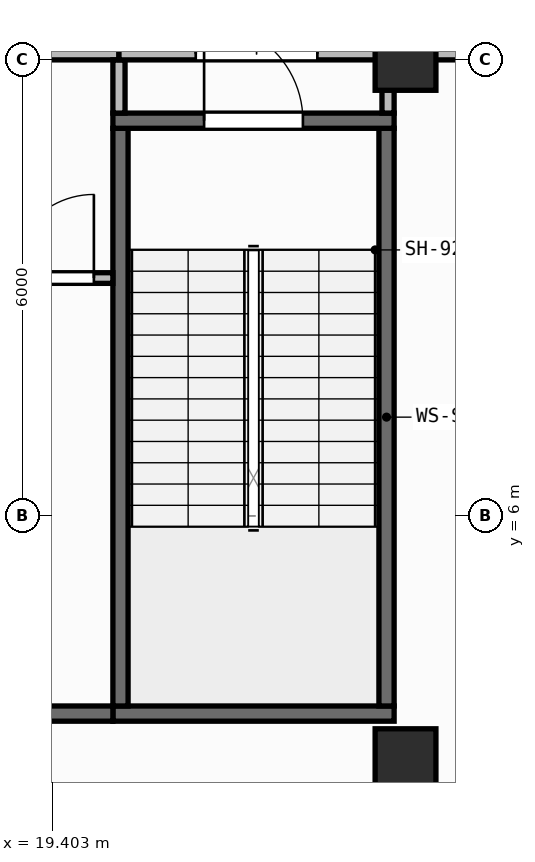
"""IFC4 building model, lengths in metres.
Left out: names, types, materials, properties, quantities, classifications, styles, units other than length and angle.
Written with IfcOpenShell. Run it as: python <this file> out.ifc"""

import sys

from ifc_helpers import new_model, si_unit, direction, frame, frame_2d, origin, origin_2d, place, context, subcontext, project, spatial, rectangle, extrude, element, fill, save


model = new_model("IFC4")
c1 = context("Model", 3, precision=1e-05, world=origin(), true_north=direction((0.0, 1.0)))
c2 = subcontext(c1, "Body", "Model", "MODEL_VIEW")
j1 = project(units=[si_unit("LENGTHUNIT", "METRE"), si_unit("PLANEANGLEUNIT", "RADIAN")], contexts=[c1])
p1 = place(None, origin())
s1 = spatial("IfcSite", under=j1, at=p1, CompositionType="ELEMENT")
p2 = place(p1, origin())
s2 = spatial("IfcBuilding", under=s1, at=p2, CompositionType="ELEMENT")
p3 = place(p2, frame((0.0, 0.0, 303.95)))
s3 = spatial("IfcBuildingStorey", under=s2, at=p3, CompositionType="ELEMENT", Elevation=303.95)
for number, where, z_axis, x_axis in (
    (1, (24.05, 2.8, 0.0), (0.0, 0.0, 1.0), (1.0, 0.0, 0.0)),
    (2, (24.05, 12.0, 0.0), (0.0, 0.0, 1.0), (1.0, 0.0, 0.0)),
):
    element("IfcColumn", number, at=place(p3, frame(where, z_axis=z_axis, x_axis=x_axis)), inside=s3, PredefinedType="COLUMN", context=c2, shape_type="SweptSolid", body=[
        extrude(rectangle(XDim=0.8, YDim=0.8, at=origin_2d()), origin(), (0.0, 0.0, 1.0), 5.25),
    ])
p4 = place(p3, frame((2.46, 0.171, 0.0), z_axis=(0.0, 0.0, 1.0), x_axis=(0.997760665813, 0.066885377746, 0.0)))
e3 = element("IfcWall", 3, at=p4, inside=s3, PredefinedType="STANDARD", context=c2, shape_type="SweptSolid", body=[
    extrude(rectangle(XDim=35.56, YDim=0.26, at=frame_2d((17.78, 0.0))), origin(), (0.0, 0.0, 1.0), 4.99),
])
p5 = place(p3, frame((20.2, 3.4, 0.0), z_axis=(0.0, 0.0, 1.0), x_axis=(1.0, 0.0, 0.0)))
e4 = element("IfcWall", 4, at=p5, inside=s3, PredefinedType="SHEAR", context=c2, shape_type="SweptSolid", body=[
    extrude(rectangle(XDim=3.7, YDim=0.2, at=frame_2d((1.85, 0.0))), origin(), (0.0, 0.0, 1.0), 4.99),
])
for number, where, z_axis, x_axis in (
    (5, (20.3, 3.5, 0.0), (0.0, 0.0, 1.0), (0.0, 1.0, 0.0)),
    (6, (23.8, 3.5, 0.0), (0.0, 0.0, 1.0), (0.0, 1.0, 0.0)),
):
    element("IfcWall", number, at=place(p3, frame(where, z_axis=z_axis, x_axis=x_axis)), inside=s3, PredefinedType="SHEAR", context=c2, shape_type="SweptSolid", body=[
        extrude(rectangle(XDim=7.6, YDim=0.2, at=frame_2d((3.8, 0.0))), origin(), (0.0, 0.0, 1.0), 4.99),
    ])
p6 = place(p3, frame((20.2, 11.2, 0.0), z_axis=(0.0, 0.0, 1.0), x_axis=(1.0, 0.0, 0.0)))
e7 = element("IfcWall", 7, at=p6, inside=s3, PredefinedType="SHEAR", context=c2, shape_type="SweptSolid", body=[
    extrude(rectangle(XDim=3.7, YDim=0.2, at=frame_2d((1.85, 0.0))), origin(), (0.0, 0.0, 1.0), 4.99),
])
p7 = place(p6, frame((1.2, 0.0, 0.0)))
e8 = element("IfcOpeningElement", 8, at=p7, cuts=e7, PredefinedType="OPENING", context=c2, shape_type="SweptSolid", body=[
    extrude(rectangle(XDim=1.3, YDim=2.15, at=frame_2d((0.65, 1.075))), frame((0.0, 0.11, 0.0), z_axis=(0.0, -1.0, 0.0), x_axis=(1.0, 0.0, 0.0)), (0.0, 0.0, 1.0), 0.22),
])
p8 = place(p3, frame((6.5, 3.4, 0.0), z_axis=(0.0, 0.0, 1.0), x_axis=(1.0, 0.0, 0.0)))
e9 = element("IfcWall", 9, at=p8, inside=s3, PredefinedType="SHEAR", context=c2, shape_type="SweptSolid", body=[
    extrude(rectangle(XDim=13.7, YDim=0.2, at=frame_2d((6.85, 0.0))), origin(), (0.0, 0.0, 1.0), 4.99),
])
p9 = place(p3, frame((18.61, 9.13, 0.0), z_axis=(0.0, 0.0, 1.0), x_axis=(1.0, 0.0, 0.0)))
e10 = element("IfcWall", 10, at=p9, inside=s3, PredefinedType="PARTITIONING", context=c2, shape_type="SweptSolid", body=[
    extrude(rectangle(XDim=1.59, YDim=0.14, at=frame_2d((0.795, 0.0))), origin(), (0.0, 0.0, 1.0), 4.99),
])
p10 = place(p9, frame((0.24, 0.0, 0.0)))
e11 = element("IfcOpeningElement", 11, at=p10, cuts=e10, PredefinedType="OPENING", context=c2, shape_type="SweptSolid", body=[
    extrude(rectangle(XDim=1.1, YDim=2.1, at=frame_2d((0.55, 1.05))), frame((0.0, 0.08, 0.0), z_axis=(0.0, -1.0, 0.0), x_axis=(1.0, 0.0, 0.0)), (0.0, 0.0, 1.0), 0.16),
])
p11 = place(p3, frame((12.58, 12.08, 0.0), z_axis=(0.0, 0.0, 1.0), x_axis=(1.0, 0.0, 0.0)))
e12 = element("IfcWall", 12, at=p11, inside=s3, PredefinedType="PARTITIONING", context=c2, shape_type="SweptSolid", body=[
    extrude(rectangle(XDim=7.7, YDim=0.16, at=frame_2d((3.85, 0.0))), origin(), (0.0, 0.0, 1.0), 4.265),
])
p12 = place(p11, frame((3.05, 0.0, 0.0)))
e13 = element("IfcOpeningElement", 13, at=p12, cuts=e12, PredefinedType="OPENING", context=c2, shape_type="SweptSolid", body=[
    extrude(rectangle(XDim=1.6, YDim=2.05, at=frame_2d((0.8, 1.025))), frame((0.0, 0.09, 0.0), z_axis=(0.0, -1.0, 0.0), x_axis=(1.0, 0.0, 0.0)), (0.0, 0.0, 1.0), 0.18),
])
p13 = place(p3, frame((20.28, 11.3, 0.0), z_axis=(0.0, 0.0, 1.0), x_axis=(0.0, 1.0, 0.0)))
e14 = element("IfcWall", 14, at=p13, inside=s3, PredefinedType="PARTITIONING", context=c2, shape_type="SweptSolid", body=[
    extrude(rectangle(XDim=0.7, YDim=0.16, at=frame_2d((0.35, 0.0))), origin(), (0.0, 0.0, 1.0), 4.99),
])
p14 = place(p3, frame((20.28, 12.08, 0.0), z_axis=(0.0, 0.0, 1.0), x_axis=(1.0, 0.0, 0.0)))
e15 = element("IfcWall", 15, at=p14, inside=s3, PredefinedType="PARTITIONING", context=c2, shape_type="SweptSolid", body=[
    extrude(rectangle(XDim=3.62, YDim=0.16, at=frame_2d((1.81, 0.0))), origin(), (0.0, 0.0, 1.0), 4.265),
])
p15 = place(p14, frame((1.01, 0.0, 0.0)))
e16 = element("IfcOpeningElement", 16, at=p15, cuts=e15, PredefinedType="OPENING", context=c2, shape_type="SweptSolid", body=[
    extrude(rectangle(XDim=1.6, YDim=2.05, at=frame_2d((0.8, 1.025))), frame((0.0, 0.09, 0.0), z_axis=(0.0, -1.0, 0.0), x_axis=(1.0, 0.0, 0.0)), (0.0, 0.0, 1.0), 0.18),
])
p16 = place(p3, frame((23.82, 11.3, 0.0), z_axis=(0.0, 0.0, 1.0), x_axis=(0.0, 1.0, 0.0)))
e17 = element("IfcWall", 17, at=p16, inside=s3, PredefinedType="PARTITIONING", context=c2, shape_type="SweptSolid", body=[
    extrude(rectangle(XDim=0.7, YDim=0.16, at=frame_2d((0.35, 0.0))), origin(), (0.0, 0.0, 1.0), 4.99),
])
p17 = place(p3, frame((23.92, 12.08, 0.0), z_axis=(0.0, 0.0, 1.0), x_axis=(1.0, 0.0, 0.0)))
e18 = element("IfcWall", 18, at=p17, inside=s3, PredefinedType="PARTITIONING", context=c2, shape_type="SweptSolid", body=[
    extrude(rectangle(XDim=9.36, YDim=0.16, at=frame_2d((4.68, 0.0))), origin(), (0.0, 0.0, 1.0), 4.265),
])
p18 = place(p7, origin())
e19 = element("IfcDoor", 19, at=p18, inside=s3, OperationType="SINGLE_SWING_LEFT", PredefinedType="DOOR", context=c2, shape_type="SweptSolid", body=[
    extrude(rectangle(XDim=1.3, YDim=2.15, at=frame_2d((0.65, 1.075))), frame((0.0, 0.025, 0.0), z_axis=(0.0, -1.0, 0.0), x_axis=(1.0, 0.0, 0.0)), (0.0, 0.0, 1.0), 0.05),
])
fill(e8, e19)
p19 = place(p10, origin())
e20 = element("IfcDoor", 20, at=p19, inside=s3, OperationType="SINGLE_SWING_RIGHT", PredefinedType="DOOR", context=c2, shape_type="SweptSolid", body=[
    extrude(rectangle(XDim=1.1, YDim=2.1, at=frame_2d((0.55, 1.05))), frame((0.0, 0.025, 0.0), z_axis=(0.0, -1.0, 0.0), x_axis=(1.0, 0.0, 0.0)), (0.0, 0.0, 1.0), 0.05),
])
fill(e11, e20)
p20 = place(p15, origin())
e21 = element("IfcDoor", 21, at=p20, inside=s3, OperationType="DOUBLE_DOOR_SINGLE_SWING", PredefinedType="DOOR", context=c2, shape_type="SweptSolid", body=[
    extrude(rectangle(XDim=1.6, YDim=2.05, at=frame_2d((0.8, 1.025))), frame((0.0, 0.025, 0.0), z_axis=(0.0, -1.0, 0.0), x_axis=(1.0, 0.0, 0.0)), (0.0, 0.0, 1.0), 0.05),
])
fill(e16, e21)
save(model, sys.argv[1])
